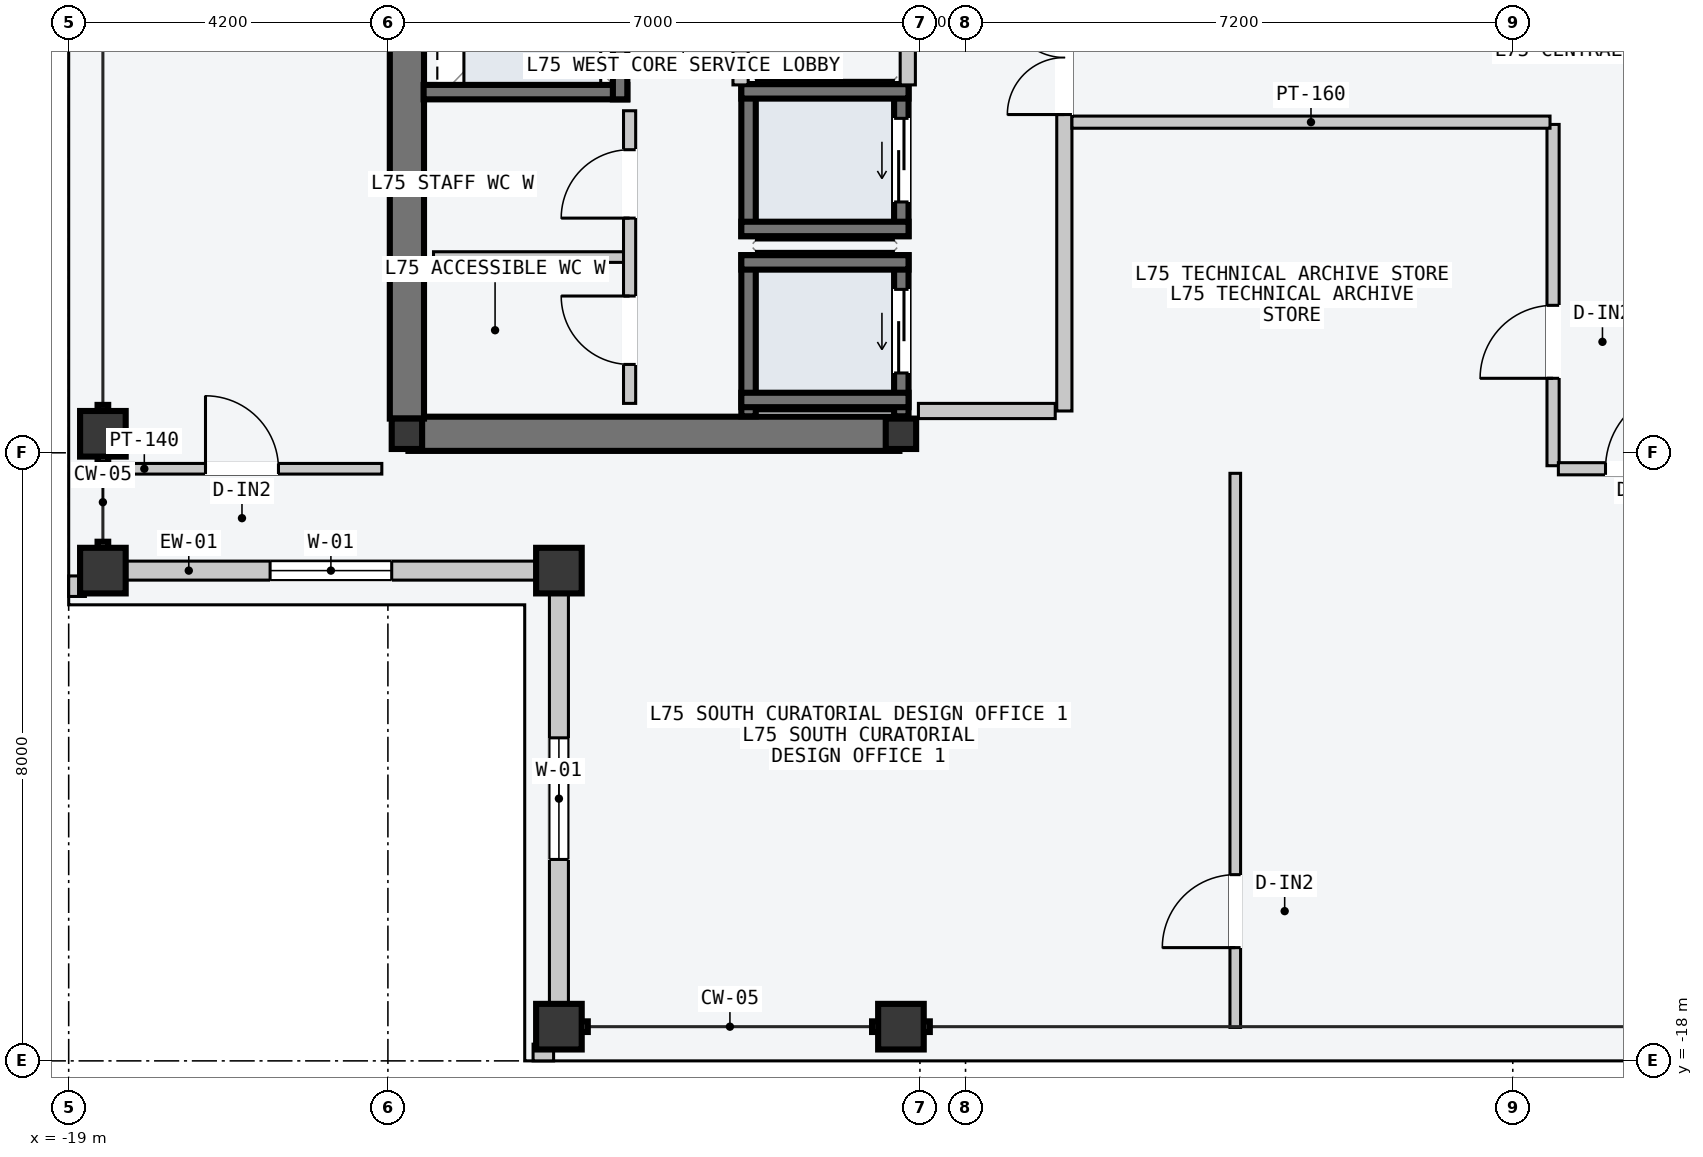
"""IFC4 building model, lengths in metres.
Left out: names, types, materials, properties, quantities, classifications, styles, units other than length and angle.
Written with IfcOpenShell. Run it as: python <this file> out.ifc"""

import sys

from ifc_helpers import new_model, si_unit, direction, frame, frame_2d, origin, origin_2d, place, context, subcontext, project, spatial, rectangle, hollow_rectangle, i_section, extrude, element, fill, save


model = new_model("IFC4")
c1 = context("Model", 3, precision=1e-05, world=origin(), true_north=direction((0.0, 1.0)))
c2 = subcontext(c1, "Body", "Model", "MODEL_VIEW")
j1 = project(units=[si_unit("LENGTHUNIT", "METRE"), si_unit("PLANEANGLEUNIT", "RADIAN")], contexts=[c1])
p1 = place(None, origin())
s1 = spatial("IfcSite", under=j1, at=p1, CompositionType="ELEMENT")
p2 = place(p1, origin())
s2 = spatial("IfcBuilding", under=s1, at=p2, CompositionType="ELEMENT")
p3 = place(p2, frame((0.0, 0.0, 284.4)))
s3 = spatial("IfcBuildingStorey", under=s2, at=p3, CompositionType="ELEMENT", Elevation=284.4)
p4 = place(p3, frame((-14.53, -9.75, -0.2), z_axis=(0.0, 0.0, 1.0), x_axis=(1.0, 0.0, 0.0)))
e1 = element("IfcWall", 1, at=p4, inside=s3, PredefinedType="SHEAR", context=c2, shape_type="SweptSolid", body=[
    extrude(rectangle(XDim=6.46, YDim=0.45, at=frame_2d((3.23, 0.0))), origin(), (0.0, 0.0, 1.0), 4.8),
])
p5 = place(p3, frame((-14.55, -9.55, -0.2), z_axis=(0.0, 0.0, 1.0), x_axis=(0.0, 1.0, 0.0)))
e2 = element("IfcWall", 2, at=p5, inside=s3, PredefinedType="SHEAR", context=c2, shape_type="SweptSolid", body=[
    extrude(rectangle(XDim=9.35, YDim=0.45, at=frame_2d((4.675, 0.0))), origin(), (0.0, 0.0, 1.0), 4.8),
])
for number, where, z_axis, x_axis in (
    (3, (-14.55, -9.75, 0.0), (0.0, 0.0, 1.0), (1.0, 0.0, 0.0)),
    (4, (-8.05, -9.75, 0.0), (0.0, 0.0, 1.0), (1.0, 0.0, 0.0)),
):
    element("IfcColumn", number, at=place(p3, frame(where, z_axis=z_axis, x_axis=x_axis)), inside=s3, PredefinedType="COLUMN", context=c2, shape_type="SweptSolid", body=[
        extrude(i_section(OverallWidth=0.4, OverallDepth=0.4, WebThickness=0.013, FlangeThickness=0.021, at=origin_2d()), origin(), (0.0, 0.0, 1.0), 4.8),
    ])
for number, where, z_axis, x_axis in (
    (5, (-12.55, -17.55, 0.0), (0.0, 0.0, 1.0), (1.0, 0.0, 0.0)),
    (6, (-8.05, -17.55, 0.0), (0.0, 0.0, 1.0), (1.0, 0.0, 0.0)),
    (7, (-18.55, -11.55, 0.0), (0.0, 0.0, 1.0), (0.0, 1.0, 0.0)),
    (8, (-18.55, -9.75, 0.0), (0.0, 0.0, 1.0), (0.0, 1.0, 0.0)),
    (9, (-12.55, -11.55, 0.0), (0.0, 0.0, 1.0), (1.0, 0.0, 0.0)),
):
    element("IfcColumn", number, at=place(p3, frame(where, z_axis=z_axis, x_axis=x_axis)), inside=s3, PredefinedType="COLUMN", context=c2, shape_type="SweptSolid", body=[
        extrude(hollow_rectangle(XDim=0.6, YDim=0.6, WallThickness=0.025, at=origin_2d()), origin(), (0.0, 0.0, 1.0), 4.8),
    ])
p6 = place(p3, frame((-18.24, -11.55, 0.0), z_axis=(0.0, 0.0, 1.0), x_axis=(1.0, 0.0, 0.0)))
e10 = element("IfcWall", 10, at=p6, inside=s3, PredefinedType="STANDARD", context=c2, shape_type="SweptSolid", body=[
    extrude(rectangle(XDim=5.38, YDim=0.25, at=frame_2d((2.69, 0.0))), origin(), (0.0, 0.0, 1.0), 4.05),
])
p7 = place(p6, frame((1.89, 0.0, 0.85)))
e11 = element("IfcOpeningElement", 11, at=p7, cuts=e10, PredefinedType="OPENING", context=c2, shape_type="SweptSolid", body=[
    extrude(rectangle(XDim=1.6, YDim=2.0, at=frame_2d((0.8, 1.0))), frame((0.0, 0.135, 0.0), z_axis=(0.0, -1.0, 0.0), x_axis=(1.0, 0.0, 0.0)), (0.0, 0.0, 1.0), 0.27),
])
p8 = place(p3, frame((-12.55, -17.24, 0.0), z_axis=(0.0, 0.0, 1.0), x_axis=(0.0, 1.0, 0.0)))
e12 = element("IfcWall", 12, at=p8, inside=s3, PredefinedType="STANDARD", context=c2, shape_type="SweptSolid", body=[
    extrude(rectangle(XDim=5.38, YDim=0.25, at=frame_2d((2.69, 0.0))), origin(), (0.0, 0.0, 1.0), 4.05),
])
p9 = place(p8, frame((1.89, 0.0, 0.85)))
e13 = element("IfcOpeningElement", 13, at=p9, cuts=e12, PredefinedType="OPENING", context=c2, shape_type="SweptSolid", body=[
    extrude(rectangle(XDim=1.6, YDim=2.0, at=frame_2d((0.8, 1.0))), frame((0.0, 0.135, 0.0), z_axis=(0.0, -1.0, 0.0), x_axis=(1.0, 0.0, 0.0)), (0.0, 0.0, 1.0), 0.27),
])
for number, where, z_axis, x_axis in (
    (14, (-12.89, -17.89, 0.0), (0.0, 0.0, 1.0), (1.0, 0.0, 0.0)),
    (15, (-18.89, -11.89, 0.0), (0.0, 0.0, 1.0), (0.0, 1.0, 0.0)),
):
    element("IfcWall", number, at=place(p3, frame(where, z_axis=z_axis, x_axis=x_axis)), inside=s3, PredefinedType="PARAPET", context=c2, shape_type="SweptSolid", body=[
        extrude(rectangle(XDim=0.27, YDim=0.22, at=frame_2d((0.135, 0.0))), origin(), (0.0, 0.0, 1.0), 1.2),
    ])
p10 = place(p3, frame((-8.045, -9.52, -0.2), z_axis=(0.0, 0.0, 1.0), x_axis=(0.0, 1.0, 0.0)))
e16 = element("IfcWall", 16, at=p10, inside=s3, PredefinedType="SOLIDWALL", context=c2, shape_type="SweptSolid", body=[
    extrude(rectangle(XDim=2.12, YDim=0.19, at=frame_2d((1.06, 0.0))), origin(), (0.0, 0.0, 1.0), 4.8),
])
p11 = place(p10, frame((0.57, 0.0, 0.2)))
e17 = element("IfcOpeningElement", 17, at=p11, cuts=e16, PredefinedType="OPENING", context=c2, shape_type="SweptSolid", body=[
    extrude(rectangle(XDim=1.1, YDim=2.2, at=frame_2d((0.55, 1.1))), frame((0.0, 0.105, 0.0), z_axis=(0.0, -1.0, 0.0), x_axis=(1.0, 0.0, 0.0)), (0.0, 0.0, 1.0), 0.21),
])
p12 = place(p3, frame((-10.055, -9.52, -0.2), z_axis=(0.0, 0.0, 1.0), x_axis=(0.0, 1.0, 0.0)))
e18 = element("IfcWall", 18, at=p12, inside=s3, PredefinedType="SOLIDWALL", context=c2, shape_type="SweptSolid", body=[
    extrude(rectangle(XDim=2.12, YDim=0.19, at=frame_2d((1.06, 0.0))), origin(), (0.0, 0.0, 1.0), 4.8),
])
for number, where, z_axis, x_axis in (
    (19, (-10.15, -7.495, -0.2), (0.0, 0.0, 1.0), (1.0, 0.0, 0.0)),
    (20, (-10.15, -9.305, -0.2), (0.0, 0.0, 1.0), (1.0, 0.0, 0.0)),
):
    element("IfcWall", number, at=place(p3, frame(where, z_axis=z_axis, x_axis=x_axis)), inside=s3, PredefinedType="SOLIDWALL", context=c2, shape_type="SweptSolid", body=[
        extrude(rectangle(XDim=2.2, YDim=0.19, at=frame_2d((1.1, 0.0))), origin(), (0.0, 0.0, 1.0), 4.8),
    ])
p13 = place(p3, frame((-8.045, -7.15, -0.2), z_axis=(0.0, 0.0, 1.0), x_axis=(0.0, 1.0, 0.0)))
e21 = element("IfcWall", 21, at=p13, inside=s3, PredefinedType="SOLIDWALL", context=c2, shape_type="SweptSolid", body=[
    extrude(rectangle(XDim=2.0, YDim=0.19, at=frame_2d((1.0, 0.0))), origin(), (0.0, 0.0, 1.0), 4.8),
])
p14 = place(p13, frame((0.45, 0.0, 0.2)))
e22 = element("IfcOpeningElement", 22, at=p14, cuts=e21, PredefinedType="OPENING", context=c2, shape_type="SweptSolid", body=[
    extrude(rectangle(XDim=1.1, YDim=2.2, at=frame_2d((0.55, 1.1))), frame((0.0, 0.105, 0.0), z_axis=(0.0, -1.0, 0.0), x_axis=(1.0, 0.0, 0.0)), (0.0, 0.0, 1.0), 0.21),
])
p15 = place(p3, frame((-10.055, -7.15, -0.2), z_axis=(0.0, 0.0, 1.0), x_axis=(0.0, 1.0, 0.0)))
e23 = element("IfcWall", 23, at=p15, inside=s3, PredefinedType="SOLIDWALL", context=c2, shape_type="SweptSolid", body=[
    extrude(rectangle(XDim=2.0, YDim=0.19, at=frame_2d((1.0, 0.0))), origin(), (0.0, 0.0, 1.0), 4.8),
])
for number, where, z_axis, x_axis in (
    (24, (-10.15, -5.245, -0.2), (0.0, 0.0, 1.0), (1.0, 0.0, 0.0)),
    (25, (-10.15, -7.055, -0.2), (0.0, 0.0, 1.0), (1.0, 0.0, 0.0)),
):
    element("IfcWall", number, at=place(p3, frame(where, z_axis=z_axis, x_axis=x_axis)), inside=s3, PredefinedType="SOLIDWALL", context=c2, shape_type="SweptSolid", body=[
        extrude(rectangle(XDim=2.2, YDim=0.19, at=frame_2d((1.1, 0.0))), origin(), (0.0, 0.0, 1.0), 4.8),
    ])
p16 = place(p3, frame((-14.33, -5.255, -0.2), z_axis=(0.0, 0.0, 1.0), x_axis=(1.0, 0.0, 0.0)))
e26 = element("IfcWall", 26, at=p16, inside=s3, PredefinedType="SOLIDWALL", context=c2, shape_type="SweptSolid", body=[
    extrude(rectangle(XDim=2.68, YDim=0.19, at=frame_2d((1.34, 0.0))), origin(), (0.0, 0.0, 1.0), 4.8),
])
p17 = place(p3, frame((-11.745, -5.35, -0.2), z_axis=(0.0, 0.0, 1.0), x_axis=(0.0, 1.0, 0.0)))
e27 = element("IfcWall", 27, at=p17, inside=s3, PredefinedType="SOLIDWALL", context=c2, shape_type="SweptSolid", body=[
    extrude(rectangle(XDim=2.6, YDim=0.19, at=frame_2d((1.3, 0.0))), origin(), (0.0, 0.0, 1.0), 4.8),
])
p18 = place(p3, frame((-5.9, -9.45, 0.0), z_axis=(0.0, 0.0, 1.0), x_axis=(0.0, 1.0, 0.0)))
e28 = element("IfcWall", 28, at=p18, inside=s3, PredefinedType="PARTITIONING", context=c2, shape_type="SweptSolid", body=[
    extrude(rectangle(XDim=10.5, YDim=0.2, at=frame_2d((5.25, 0.0))), origin(), (0.0, 0.0, 1.0), 4.6),
])
p19 = place(p18, frame((3.9, 0.0, 0.0)))
e29 = element("IfcOpeningElement", 29, at=p19, cuts=e28, PredefinedType="OPENING", context=c2, shape_type="SweptSolid", body=[
    extrude(rectangle(XDim=1.5, YDim=2.2, at=frame_2d((0.75, 1.1))), frame((0.0, 0.11, 0.0), z_axis=(0.0, -1.0, 0.0), x_axis=(1.0, 0.0, 0.0)), (0.0, 0.0, 1.0), 0.22),
])
p20 = place(p3, frame((-6.02, -9.45, 0.0), z_axis=(0.0, 0.0, 1.0), x_axis=(-1.0, 0.0, 0.0)))
e30 = element("IfcWall", 30, at=p20, inside=s3, PredefinedType="PARTITIONING", context=c2, shape_type="SweptSolid", body=[
    extrude(rectangle(XDim=1.8, YDim=0.2, at=frame_2d((0.9, 0.0))), origin(), (0.0, 0.0, 1.0), 4.6),
])
for number, where, z_axis, x_axis in (
    (31, (-7.96, -5.16, 0.0), (0.0, 0.0, 1.0), (0.0, 1.0, 0.0)),
    (32, (-10.16, -5.16, 0.0), (0.0, 0.0, 1.0), (0.0, 1.0, 0.0)),
):
    element("IfcWall", number, at=place(p3, frame(where, z_axis=z_axis, x_axis=x_axis)), inside=s3, PredefinedType="PARTITIONING", context=c2, shape_type="SweptSolid", body=[
        extrude(rectangle(XDim=2.44, YDim=0.2, at=frame_2d((1.22, 0.0))), origin(), (0.0, 0.0, 1.0), 4.6),
    ])
p21 = place(p3, frame((-11.7, -7.425, 0.0), z_axis=(0.0, 0.0, 1.0), x_axis=(-1.0, 0.0, 0.0)))
e33 = element("IfcWall", 33, at=p21, inside=s3, PredefinedType="PARTITIONING", context=c2, shape_type="SweptSolid", body=[
    extrude(rectangle(XDim=2.5, YDim=0.14, at=frame_2d((1.25, 0.0))), origin(), (0.0, 0.0, 1.0), 4.6),
])
p22 = place(p3, frame((-11.62, -9.35, 0.0), z_axis=(0.0, 0.0, 1.0), x_axis=(0.0, 1.0, 0.0)))
e34 = element("IfcWall", 34, at=p22, inside=s3, PredefinedType="PARTITIONING", context=c2, shape_type="SweptSolid", body=[
    extrude(rectangle(XDim=3.85, YDim=0.16, at=frame_2d((1.925, 0.0))), origin(), (0.0, 0.0, 1.0), 4.6),
])
p23 = place(p22, frame((0.512, 0.0, 0.0)))
e35 = element("IfcOpeningElement", 35, at=p23, cuts=e34, PredefinedType="OPENING", context=c2, shape_type="SweptSolid", body=[
    extrude(rectangle(XDim=0.9, YDim=2.15, at=frame_2d((0.45, 1.075))), frame((0.0, 0.09, 0.0), z_axis=(0.0, -1.0, 0.0), x_axis=(1.0, 0.0, 0.0)), (0.0, 0.0, 1.0), 0.18),
])
p24 = place(p22, frame((2.438, 0.0, 0.0)))
e36 = element("IfcOpeningElement", 36, at=p24, cuts=e34, PredefinedType="OPENING", context=c2, shape_type="SweptSolid", body=[
    extrude(rectangle(XDim=0.9, YDim=2.15, at=frame_2d((0.45, 1.075))), frame((0.0, 0.09, 0.0), z_axis=(0.0, -1.0, 0.0), x_axis=(1.0, 0.0, 0.0)), (0.0, 0.0, 1.0), 0.18),
])
p25 = place(p3, frame((0.53, -10.17, 0.0), z_axis=(0.0, 0.0, 1.0), x_axis=(0.0, 1.0, 0.0)))
e37 = element("IfcWall", 37, at=p25, inside=s3, PredefinedType="PARTITIONING", context=c2, shape_type="SweptSolid", body=[
    extrude(rectangle(XDim=4.49, YDim=0.16, at=frame_2d((2.245, 0.0))), origin(), (0.0, 0.0, 1.0), 4.6),
])
p26 = place(p25, frame((1.15, 0.0, 0.0)))
e38 = element("IfcOpeningElement", 38, at=p26, cuts=e37, PredefinedType="OPENING", context=c2, shape_type="SweptSolid", body=[
    extrude(rectangle(XDim=0.96, YDim=2.18, at=frame_2d((0.48, 1.09))), frame((0.0, 0.09, 0.0), z_axis=(0.0, -1.0, 0.0), x_axis=(1.0, 0.0, 0.0)), (0.0, 0.0, 1.0), 0.18),
])
p27 = place(p3, frame((-5.8, -5.65, 0.0), z_axis=(0.0, 0.0, 1.0), x_axis=(1.0, 0.0, 0.0)))
e39 = element("IfcWall", 39, at=p27, inside=s3, PredefinedType="PARTITIONING", context=c2, shape_type="SweptSolid", body=[
    extrude(rectangle(XDim=6.29, YDim=0.16, at=frame_2d((3.145, 0.0))), origin(), (0.0, 0.0, 1.0), 4.6),
])
p28 = place(p3, frame((-3.651, -17.56, 0.0), z_axis=(0.0, 0.0, 1.0), x_axis=(0.0, 1.0, 0.0)))
e40 = element("IfcWall", 40, at=p28, inside=s3, PredefinedType="PARTITIONING", context=c2, shape_type="SweptSolid", body=[
    extrude(rectangle(XDim=7.29, YDim=0.14, at=frame_2d((3.645, 0.0))), origin(), (0.0, 0.0, 1.0), 4.6),
])
p29 = place(p28, frame((1.05, 0.0, 0.0)))
e41 = element("IfcOpeningElement", 41, at=p29, cuts=e40, PredefinedType="OPENING", context=c2, shape_type="SweptSolid", body=[
    extrude(rectangle(XDim=0.96, YDim=2.18, at=frame_2d((0.48, 1.09))), frame((0.0, 0.08, 0.0), z_axis=(0.0, -1.0, 0.0), x_axis=(1.0, 0.0, 0.0)), (0.0, 0.0, 1.0), 0.16),
])
p30 = place(p3, frame((0.6, -10.21, 0.0), z_axis=(0.0, 0.0, 1.0), x_axis=(1.0, 0.0, 0.0)))
e42 = element("IfcWall", 42, at=p30, inside=s3, PredefinedType="PARTITIONING", context=c2, shape_type="SweptSolid", body=[
    extrude(rectangle(XDim=2.3, YDim=0.16, at=frame_2d((1.15, 0.0))), origin(), (0.0, 0.0, 1.0), 4.6),
])
p31 = place(p30, frame((0.62, 0.0, 0.0)))
e43 = element("IfcOpeningElement", 43, at=p31, cuts=e42, PredefinedType="OPENING", context=c2, shape_type="SweptSolid", body=[
    extrude(rectangle(XDim=1.06, YDim=2.2, at=frame_2d((0.53, 1.1))), frame((0.0, 0.09, 0.0), z_axis=(0.0, -1.0, 0.0), x_axis=(1.0, 0.0, 0.0)), (0.0, 0.0, 1.0), 0.18),
])
p32 = place(p3, frame((-18.56, -10.21, 0.0), z_axis=(0.0, 0.0, 1.0), x_axis=(1.0, 0.0, 0.0)))
e44 = element("IfcWall", 44, at=p32, inside=s3, PredefinedType="PARTITIONING", context=c2, shape_type="SweptSolid", body=[
    extrude(rectangle(XDim=3.68, YDim=0.14, at=frame_2d((1.84, 0.0))), origin(), (0.0, 0.0, 1.0), 4.6),
])
p33 = place(p32, frame((1.36, 0.0, 0.0)))
e45 = element("IfcOpeningElement", 45, at=p33, cuts=e44, PredefinedType="OPENING", context=c2, shape_type="SweptSolid", body=[
    extrude(rectangle(XDim=0.96, YDim=2.18, at=frame_2d((0.48, 1.09))), frame((0.0, 0.08, 0.0), z_axis=(0.0, -1.0, 0.0), x_axis=(1.0, 0.0, 0.0)), (0.0, 0.0, 1.0), 0.16),
])
p34 = place(p7, origin())
e46 = element("IfcWindow", 46, at=p34, inside=s3, PartitioningType="SINGLE_PANEL", PredefinedType="WINDOW", context=c2, shape_type="SweptSolid", body=[
    extrude(rectangle(XDim=1.6, YDim=2.0, at=frame_2d((0.8, 1.0))), frame((0.0, 0.03, 0.0), z_axis=(0.0, -1.0, 0.0), x_axis=(1.0, 0.0, 0.0)), (0.0, 0.0, 1.0), 0.06),
])
fill(e11, e46)
p35 = place(p9, origin())
e47 = element("IfcWindow", 47, at=p35, inside=s3, PartitioningType="SINGLE_PANEL", PredefinedType="WINDOW", context=c2, shape_type="SweptSolid", body=[
    extrude(rectangle(XDim=1.6, YDim=2.0, at=frame_2d((0.8, 1.0))), frame((0.0, 0.03, 0.0), z_axis=(0.0, -1.0, 0.0), x_axis=(1.0, 0.0, 0.0)), (0.0, 0.0, 1.0), 0.06),
])
fill(e13, e47)
p36 = place(p11, origin())
e48 = element("IfcDoor", 48, at=p36, inside=s3, OperationType="SLIDING_TO_LEFT", PredefinedType="DOOR", context=c2, shape_type="SweptSolid", body=[
    extrude(rectangle(XDim=1.1, YDim=2.2, at=frame_2d((0.55, 1.1))), frame((0.0, 0.025, 0.0), z_axis=(0.0, -1.0, 0.0), x_axis=(1.0, 0.0, 0.0)), (0.0, 0.0, 1.0), 0.05),
])
fill(e17, e48)
p37 = place(p14, origin())
e49 = element("IfcDoor", 49, at=p37, inside=s3, OperationType="SLIDING_TO_LEFT", PredefinedType="DOOR", context=c2, shape_type="SweptSolid", body=[
    extrude(rectangle(XDim=1.1, YDim=2.2, at=frame_2d((0.55, 1.1))), frame((0.0, 0.025, 0.0), z_axis=(0.0, -1.0, 0.0), x_axis=(1.0, 0.0, 0.0)), (0.0, 0.0, 1.0), 0.05),
])
fill(e22, e49)
p38 = place(p19, origin())
e50 = element("IfcDoor", 50, at=p38, inside=s3, OperationType="DOUBLE_DOOR_SINGLE_SWING", PredefinedType="DOOR", context=c2, shape_type="SweptSolid", body=[
    extrude(rectangle(XDim=1.5, YDim=2.2, at=frame_2d((0.75, 1.1))), frame((0.0, 0.025, 0.0), z_axis=(0.0, -1.0, 0.0), x_axis=(1.0, 0.0, 0.0)), (0.0, 0.0, 1.0), 0.05),
])
fill(e29, e50)
p39 = place(p23, origin())
e51 = element("IfcDoor", 51, at=p39, inside=s3, OperationType="SINGLE_SWING_RIGHT", PredefinedType="DOOR", context=c2, shape_type="SweptSolid", body=[
    extrude(rectangle(XDim=0.9, YDim=2.15, at=frame_2d((0.45, 1.075))), frame((0.0, 0.025, 0.0), z_axis=(0.0, -1.0, 0.0), x_axis=(1.0, 0.0, 0.0)), (0.0, 0.0, 1.0), 0.05),
])
fill(e35, e51)
p40 = place(p24, origin())
e52 = element("IfcDoor", 52, at=p40, inside=s3, OperationType="SINGLE_SWING_LEFT", PredefinedType="DOOR", context=c2, shape_type="SweptSolid", body=[
    extrude(rectangle(XDim=0.9, YDim=2.15, at=frame_2d((0.45, 1.075))), frame((0.0, 0.025, 0.0), z_axis=(0.0, -1.0, 0.0), x_axis=(1.0, 0.0, 0.0)), (0.0, 0.0, 1.0), 0.05),
])
fill(e36, e52)
p41 = place(p26, origin())
e53 = element("IfcDoor", 53, at=p41, inside=s3, OperationType="SINGLE_SWING_LEFT", PredefinedType="DOOR", context=c2, shape_type="SweptSolid", body=[
    extrude(rectangle(XDim=0.96, YDim=2.18, at=frame_2d((0.48, 1.09))), frame((0.0, 0.025, 0.0), z_axis=(0.0, -1.0, 0.0), x_axis=(1.0, 0.0, 0.0)), (0.0, 0.0, 1.0), 0.05),
])
fill(e38, e53)
p42 = place(p29, origin())
e54 = element("IfcDoor", 54, at=p42, inside=s3, OperationType="SINGLE_SWING_LEFT", PredefinedType="DOOR", context=c2, shape_type="SweptSolid", body=[
    extrude(rectangle(XDim=0.96, YDim=2.18, at=frame_2d((0.48, 1.09))), frame((0.0, 0.025, 0.0), z_axis=(0.0, -1.0, 0.0), x_axis=(1.0, 0.0, 0.0)), (0.0, 0.0, 1.0), 0.05),
])
fill(e41, e54)
p43 = place(p31, origin())
e55 = element("IfcDoor", 55, at=p43, inside=s3, OperationType="SINGLE_SWING_RIGHT", PredefinedType="DOOR", context=c2, shape_type="SweptSolid", body=[
    extrude(rectangle(XDim=1.06, YDim=2.2, at=frame_2d((0.53, 1.1))), frame((0.0, 0.025, 0.0), z_axis=(0.0, -1.0, 0.0), x_axis=(1.0, 0.0, 0.0)), (0.0, 0.0, 1.0), 0.05),
])
fill(e43, e55)
p44 = place(p33, origin())
e56 = element("IfcDoor", 56, at=p44, inside=s3, OperationType="SINGLE_SWING_LEFT", PredefinedType="DOOR", context=c2, shape_type="SweptSolid", body=[
    extrude(rectangle(XDim=0.96, YDim=2.18, at=frame_2d((0.48, 1.09))), frame((0.0, 0.025, 0.0), z_axis=(0.0, -1.0, 0.0), x_axis=(1.0, 0.0, 0.0)), (0.0, 0.0, 1.0), 0.05),
])
fill(e45, e56)
save(model, sys.argv[1])
